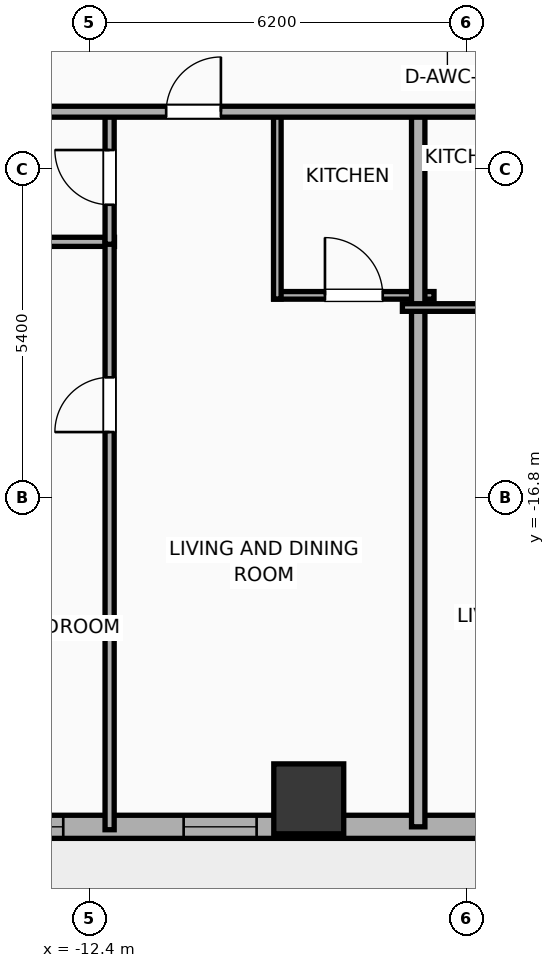
"""IFC4 building model, lengths in metres.
Left out: names, types, materials, properties, quantities, classifications, styles, units other than length and angle.
Written with IfcOpenShell. Run it as: python <this file> out.ifc"""

import sys

from ifc_helpers import new_model, si_unit, direction, frame, frame_2d, origin, origin_2d, place, context, subcontext, project, spatial, rectangle, hollow_rectangle, extrude, element, fill, save


model = new_model("IFC4")
c1 = context("Model", 3, precision=1e-05, world=origin(), true_north=direction((0.0, 1.0)))
c2 = subcontext(c1, "Body", "Model", "MODEL_VIEW")
j1 = project(units=[si_unit("LENGTHUNIT", "METRE"), si_unit("PLANEANGLEUNIT", "RADIAN")], contexts=[c1])
p1 = place(None, origin())
s1 = spatial("IfcSite", under=j1, at=p1, CompositionType="ELEMENT")
p2 = place(p1, origin())
s2 = spatial("IfcBuilding", under=s1, at=p2, CompositionType="ELEMENT")
p3 = place(p2, frame((0.0, 0.0, 26.0)))
s3 = spatial("IfcBuildingStorey", under=s2, at=p3, CompositionType="ELEMENT", Elevation=26.0)
p4 = place(p3, frame((-8.8, -21.75, -0.25), z_axis=(0.0, 0.0, 1.0), x_axis=(1.0, 0.0, 0.0)))
e1 = element("IfcColumn", 1, at=p4, inside=s3, PredefinedType="COLUMN", context=c2, shape_type="SweptSolid", body=[
    extrude(hollow_rectangle(XDim=1.15, YDim=1.15, WallThickness=0.04, at=origin_2d()), origin(), (0.0, 0.0, 1.0), 4.15),
])
p5 = place(p3, frame((22.381, -22.21, 0.0), z_axis=(0.0, 0.0, 1.0), x_axis=(-1.0, 0.0, 0.0)))
e2 = element("IfcWall", 2, at=p5, inside=s3, PredefinedType="ELEMENTEDWALL", context=c2, shape_type="SweptSolid", body=[
    extrude(rectangle(XDim=51.963, YDim=0.38, at=frame_2d((25.981, 0.0))), origin(), (0.0, 0.0, 1.0), 2.54),
])
p6 = place(p5, frame((25.231, 0.0, 0.0)))
e3 = element("IfcOpeningElement", 3, at=p6, cuts=e2, PredefinedType="OPENING", context=c2, shape_type="SweptSolid", body=[
    extrude(rectangle(XDim=1.5, YDim=2.05, at=frame_2d((0.75, 1.025))), frame((0.0, 0.2, 0.0), z_axis=(0.0, -1.0, 0.0), x_axis=(1.0, 0.0, 0.0)), (0.0, 0.0, 1.0), 0.4),
])
p7 = place(p5, frame((6.61, 0.0, 0.75)))
e4 = element("IfcOpeningElement", 4, at=p7, cuts=e2, PredefinedType="OPENING", context=c2, shape_type="SweptSolid", body=[
    extrude(rectangle(XDim=2.4, YDim=1.63, at=frame_2d((1.2, 0.815))), frame((0.0, 0.2, 0.0), z_axis=(0.0, -1.0, 0.0), x_axis=(1.0, 0.0, 0.0)), (0.0, 0.0, 1.0), 0.4),
])
p8 = place(p5, frame((49.132, 0.0, 0.75)))
e5 = element("IfcOpeningElement", 5, at=p8, cuts=e2, PredefinedType="OPENING", context=c2, shape_type="SweptSolid", body=[
    extrude(rectangle(XDim=1.2, YDim=1.63, at=frame_2d((0.6, 0.815))), frame((0.0, 0.2, 0.0), z_axis=(0.0, -1.0, 0.0), x_axis=(1.0, 0.0, 0.0)), (0.0, 0.0, 1.0), 0.4),
])
p9 = place(p5, frame((46.086, 0.0, 0.75)))
e6 = element("IfcOpeningElement", 6, at=p9, cuts=e2, PredefinedType="OPENING", context=c2, shape_type="SweptSolid", body=[
    extrude(rectangle(XDim=1.2, YDim=1.63, at=frame_2d((0.6, 0.815))), frame((0.0, 0.2, 0.0), z_axis=(0.0, -1.0, 0.0), x_axis=(1.0, 0.0, 0.0)), (0.0, 0.0, 1.0), 0.4),
])
p10 = place(p5, frame((42.426, 0.0, 0.75)))
e7 = element("IfcOpeningElement", 7, at=p10, cuts=e2, PredefinedType="OPENING", context=c2, shape_type="SweptSolid", body=[
    extrude(rectangle(XDim=1.2, YDim=1.63, at=frame_2d((0.6, 0.815))), frame((0.0, 0.2, 0.0), z_axis=(0.0, -1.0, 0.0), x_axis=(1.0, 0.0, 0.0)), (0.0, 0.0, 1.0), 0.4),
])
p11 = place(p5, frame((38.286, 0.0, 0.75)))
e8 = element("IfcOpeningElement", 8, at=p11, cuts=e2, PredefinedType="OPENING", context=c2, shape_type="SweptSolid", body=[
    extrude(rectangle(XDim=1.2, YDim=1.63, at=frame_2d((0.6, 0.815))), frame((0.0, 0.2, 0.0), z_axis=(0.0, -1.0, 0.0), x_axis=(1.0, 0.0, 0.0)), (0.0, 0.0, 1.0), 0.4),
])
p12 = place(p5, frame((35.219, 0.0, 0.75)))
e9 = element("IfcOpeningElement", 9, at=p12, cuts=e2, PredefinedType="OPENING", context=c2, shape_type="SweptSolid", body=[
    extrude(rectangle(XDim=1.2, YDim=1.63, at=frame_2d((0.6, 0.815))), frame((0.0, 0.2, 0.0), z_axis=(0.0, -1.0, 0.0), x_axis=(1.0, 0.0, 0.0)), (0.0, 0.0, 1.0), 0.4),
])
p13 = place(p5, frame((32.039, 0.0, 0.75)))
e10 = element("IfcOpeningElement", 10, at=p13, cuts=e2, PredefinedType="OPENING", context=c2, shape_type="SweptSolid", body=[
    extrude(rectangle(XDim=1.2, YDim=1.63, at=frame_2d((0.6, 0.815))), frame((0.0, 0.2, 0.0), z_axis=(0.0, -1.0, 0.0), x_axis=(1.0, 0.0, 0.0)), (0.0, 0.0, 1.0), 0.4),
])
p14 = place(p5, frame((22.686, 0.0, 0.75)))
e11 = element("IfcOpeningElement", 11, at=p14, cuts=e2, PredefinedType="OPENING", context=c2, shape_type="SweptSolid", body=[
    extrude(rectangle(XDim=1.2, YDim=1.63, at=frame_2d((0.6, 0.815))), frame((0.0, 0.2, 0.0), z_axis=(0.0, -1.0, 0.0), x_axis=(1.0, 0.0, 0.0)), (0.0, 0.0, 1.0), 0.4),
])
p15 = place(p5, frame((18.786, 0.0, 0.75)))
e12 = element("IfcOpeningElement", 12, at=p15, cuts=e2, PredefinedType="OPENING", context=c2, shape_type="SweptSolid", body=[
    extrude(rectangle(XDim=1.2, YDim=1.63, at=frame_2d((0.6, 0.815))), frame((0.0, 0.2, 0.0), z_axis=(0.0, -1.0, 0.0), x_axis=(1.0, 0.0, 0.0)), (0.0, 0.0, 1.0), 0.4),
])
p16 = place(p5, frame((14.886, 0.0, 0.75)))
e13 = element("IfcOpeningElement", 13, at=p16, cuts=e2, PredefinedType="OPENING", context=c2, shape_type="SweptSolid", body=[
    extrude(rectangle(XDim=1.2, YDim=1.63, at=frame_2d((0.6, 0.815))), frame((0.0, 0.2, 0.0), z_axis=(0.0, -1.0, 0.0), x_axis=(1.0, 0.0, 0.0)), (0.0, 0.0, 1.0), 0.4),
])
p17 = place(p5, frame((11.826, 0.0, 0.75)))
e14 = element("IfcOpeningElement", 14, at=p17, cuts=e2, PredefinedType="OPENING", context=c2, shape_type="SweptSolid", body=[
    extrude(rectangle(XDim=1.2, YDim=1.63, at=frame_2d((0.6, 0.815))), frame((0.0, 0.2, 0.0), z_axis=(0.0, -1.0, 0.0), x_axis=(1.0, 0.0, 0.0)), (0.0, 0.0, 1.0), 0.4),
])
p18 = place(p5, frame((2.836, 0.0, 0.75)))
e15 = element("IfcOpeningElement", 15, at=p18, cuts=e2, PredefinedType="OPENING", context=c2, shape_type="SweptSolid", body=[
    extrude(rectangle(XDim=1.2, YDim=1.63, at=frame_2d((0.6, 0.815))), frame((0.0, 0.2, 0.0), z_axis=(0.0, -1.0, 0.0), x_axis=(1.0, 0.0, 0.0)), (0.0, 0.0, 1.0), 0.4),
])
p19 = place(p3, frame((-15.06, -12.59, 0.0), z_axis=(0.0, 0.0, 1.0), x_axis=(1.0, 0.0, 0.0)))
e16 = element("IfcWall", 16, at=p19, inside=s3, PredefinedType="PLUMBINGWALL", context=c2, shape_type="SweptSolid", body=[
    extrude(rectangle(XDim=3.065, YDim=0.15, at=frame_2d((1.532, 0.0))), origin(), (0.0, 0.0, 1.0), 3.65),
])
p20 = place(p3, frame((-12.075, -22.258, 0.0), z_axis=(0.0, 0.0, 1.0), x_axis=(0.0, 1.0, 0.0)))
e17 = element("IfcWall", 17, at=p20, inside=s3, PredefinedType="PLUMBINGWALL", context=c2, shape_type="SweptSolid", body=[
    extrude(rectangle(XDim=9.708, YDim=0.15, at=frame_2d((4.854, 0.0))), origin(), (0.0, 0.0, 1.0), 3.65),
])
p21 = place(p20, frame((6.54, 0.0, 0.0)))
e18 = element("IfcOpeningElement", 18, at=p21, cuts=e17, PredefinedType="OPENING", context=c2, shape_type="SweptSolid", body=[
    extrude(rectangle(XDim=0.9, YDim=2.05, at=frame_2d((0.45, 1.025))), frame((0.0, 0.085, 0.0), z_axis=(0.0, -1.0, 0.0), x_axis=(1.0, 0.0, 0.0)), (0.0, 0.0, 1.0), 0.17),
])
p22 = place(p3, frame((-12.075, -12.63, 0.0), z_axis=(0.0, 0.0, 1.0), x_axis=(0.0, 1.0, 0.0)))
e19 = element("IfcWall", 19, at=p22, inside=s3, PredefinedType="PLUMBINGWALL", context=c2, shape_type="SweptSolid", body=[
    extrude(rectangle(XDim=2.2, YDim=0.15, at=frame_2d((1.1, 0.0))), origin(), (0.0, 0.0, 1.0), 2.54),
])
p23 = place(p22, frame((0.65, 0.0, 0.0)))
e20 = element("IfcOpeningElement", 20, at=p23, cuts=e19, PredefinedType="OPENING", context=c2, shape_type="SweptSolid", body=[
    extrude(rectangle(XDim=0.9, YDim=2.05, at=frame_2d((0.45, 1.025))), frame((0.0, 0.085, 0.0), z_axis=(0.0, -1.0, 0.0), x_axis=(1.0, 0.0, 0.0)), (0.0, 0.0, 1.0), 0.17),
])
p24 = place(p3, frame((-9.377, -13.47, 0.0), z_axis=(0.0, 0.0, 1.0), x_axis=(1.0, 0.0, 0.0)))
e21 = element("IfcWall", 21, at=p24, inside=s3, PredefinedType="PARTITIONING", context=c2, shape_type="SweptSolid", body=[
    extrude(rectangle(XDim=2.637, YDim=0.125, at=frame_2d((1.318, 0.0))), origin(), (0.0, 0.0, 1.0), 3.65),
])
p25 = place(p24, frame((0.844, 0.0, 0.0)))
e22 = element("IfcOpeningElement", 22, at=p25, cuts=e21, PredefinedType="OPENING", context=c2, shape_type="SweptSolid", body=[
    extrude(rectangle(XDim=0.95, YDim=2.05, at=frame_2d((0.475, 1.025))), frame((0.0, 0.073, 0.0), z_axis=(0.0, -1.0, 0.0), x_axis=(1.0, 0.0, 0.0)), (0.0, 0.0, 1.0), 0.145),
])
p26 = place(p3, frame((-9.317, -13.53, 0.0), z_axis=(0.0, 0.0, 1.0), x_axis=(0.0, 1.0, 0.0)))
e23 = element("IfcWall", 23, at=p26, inside=s3, PredefinedType="PARTITIONING", context=c2, shape_type="SweptSolid", body=[
    extrude(rectangle(XDim=3.1, YDim=0.125, at=frame_2d((1.55, 0.0))), origin(), (0.0, 0.0, 1.0), 3.65),
])
p27 = place(p3, frame((-7.0, -22.21, 0.0), z_axis=(0.0, 0.0, 1.0), x_axis=(0.0, 1.0, 0.0)))
e24 = element("IfcWall", 24, at=p27, inside=s3, PredefinedType="PARTITIONING", context=c2, shape_type="SweptSolid", body=[
    extrude(rectangle(XDim=11.84, YDim=0.22, at=frame_2d((5.92, 0.0))), origin(), (0.0, 0.0, 1.0), 3.65),
])
p28 = place(p3, frame((-7.26, -13.67, 0.0), z_axis=(0.0, 0.0, 1.0), x_axis=(1.0, 0.0, 0.0)))
e25 = element("IfcWall", 25, at=p28, inside=s3, PredefinedType="PARTITIONING", context=c2, shape_type="SweptSolid", body=[
    extrude(rectangle(XDim=2.69, YDim=0.125, at=frame_2d((1.345, 0.0))), origin(), (0.0, 0.0, 1.0), 3.65),
])
p29 = place(p3, frame((-33.41, -10.45, 0.0), z_axis=(0.0, 0.0, 1.0), x_axis=(1.0, 0.0, 0.0)))
e26 = element("IfcWall", 26, at=p29, inside=s3, PredefinedType="PARTITIONING", context=c2, shape_type="SweptSolid", body=[
    extrude(rectangle(XDim=59.62, YDim=0.18, at=frame_2d((29.81, 0.0))), origin(), (0.0, 0.0, 1.0), 3.65),
])
p30 = place(p29, frame((5.321, 0.0, 0.0)))
e27 = element("IfcOpeningElement", 27, at=p30, cuts=e26, PredefinedType="OPENING", context=c2, shape_type="SweptSolid", body=[
    extrude(rectangle(XDim=1.15, YDim=2.05, at=frame_2d((0.575, 1.025))), frame((0.0, 0.1, 0.0), z_axis=(0.0, -1.0, 0.0), x_axis=(1.0, 0.0, 0.0)), (0.0, 0.0, 1.0), 0.2),
])
p31 = place(p29, frame((14.3, 0.0, 0.0)))
e28 = element("IfcOpeningElement", 28, at=p31, cuts=e26, PredefinedType="OPENING", context=c2, shape_type="SweptSolid", body=[
    extrude(rectangle(XDim=1.15, YDim=2.05, at=frame_2d((0.575, 1.025))), frame((0.0, 0.1, 0.0), z_axis=(0.0, -1.0, 0.0), x_axis=(1.0, 0.0, 0.0)), (0.0, 0.0, 1.0), 0.2),
])
p32 = place(p29, frame((22.265, 0.0, 0.0)))
e29 = element("IfcOpeningElement", 29, at=p32, cuts=e26, PredefinedType="OPENING", context=c2, shape_type="SweptSolid", body=[
    extrude(rectangle(XDim=0.9, YDim=2.05, at=frame_2d((0.45, 1.025))), frame((0.0, 0.1, 0.0), z_axis=(0.0, -1.0, 0.0), x_axis=(1.0, 0.0, 0.0)), (0.0, 0.0, 1.0), 0.2),
])
p33 = place(p29, frame((29.903, 0.0, 0.0)))
e30 = element("IfcOpeningElement", 30, at=p33, cuts=e26, PredefinedType="OPENING", context=c2, shape_type="SweptSolid", body=[
    extrude(rectangle(XDim=1.15, YDim=2.05, at=frame_2d((0.575, 1.025))), frame((0.0, 0.1, 0.0), z_axis=(0.0, -1.0, 0.0), x_axis=(1.0, 0.0, 0.0)), (0.0, 0.0, 1.0), 0.2),
])
p34 = place(p29, frame((37.701, 0.0, 0.0)))
e31 = element("IfcOpeningElement", 31, at=p34, cuts=e26, PredefinedType="OPENING", context=c2, shape_type="SweptSolid", body=[
    extrude(rectangle(XDim=1.15, YDim=2.05, at=frame_2d((0.575, 1.025))), frame((0.0, 0.1, 0.0), z_axis=(0.0, -1.0, 0.0), x_axis=(1.0, 0.0, 0.0)), (0.0, 0.0, 1.0), 0.2),
])
p35 = place(p29, frame((45.654, 0.0, 0.0)))
e32 = element("IfcOpeningElement", 32, at=p35, cuts=e26, PredefinedType="OPENING", context=c2, shape_type="SweptSolid", body=[
    extrude(rectangle(XDim=0.9, YDim=2.05, at=frame_2d((0.45, 1.025))), frame((0.0, 0.1, 0.0), z_axis=(0.0, -1.0, 0.0), x_axis=(1.0, 0.0, 0.0)), (0.0, 0.0, 1.0), 0.2),
])
p36 = place(p29, frame((54.472, 0.0, 0.0)))
e33 = element("IfcOpeningElement", 33, at=p36, cuts=e26, PredefinedType="OPENING", context=c2, shape_type="SweptSolid", body=[
    extrude(rectangle(XDim=1.15, YDim=2.05, at=frame_2d((0.575, 1.025))), frame((0.0, 0.1, 0.0), z_axis=(0.0, -1.0, 0.0), x_axis=(1.0, 0.0, 0.0)), (0.0, 0.0, 1.0), 0.2),
])
p37 = place(p12, origin())
e34 = element("IfcWindow", 34, at=p37, inside=s3, PartitioningType="SINGLE_PANEL", PredefinedType="WINDOW", context=c2, shape_type="SweptSolid", body=[
    extrude(rectangle(XDim=1.2, YDim=1.63, at=frame_2d((0.6, 0.815))), frame((0.0, 0.03, 0.0), z_axis=(0.0, -1.0, 0.0), x_axis=(1.0, 0.0, 0.0)), (0.0, 0.0, 1.0), 0.06),
])
fill(e9, e34)
p38 = place(p13, origin())
e35 = element("IfcWindow", 35, at=p38, inside=s3, PartitioningType="SINGLE_PANEL", PredefinedType="WINDOW", context=c2, shape_type="SweptSolid", body=[
    extrude(rectangle(XDim=1.2, YDim=1.63, at=frame_2d((0.6, 0.815))), frame((0.0, 0.03, 0.0), z_axis=(0.0, -1.0, 0.0), x_axis=(1.0, 0.0, 0.0)), (0.0, 0.0, 1.0), 0.06),
])
fill(e10, e35)
p39 = place(p21, origin())
e36 = element("IfcDoor", 36, at=p39, inside=s3, OperationType="SINGLE_SWING_LEFT", PredefinedType="DOOR", context=c2, shape_type="SweptSolid", body=[
    extrude(rectangle(XDim=0.9, YDim=2.05, at=frame_2d((0.45, 1.025))), frame((0.0, 0.025, 0.0), z_axis=(0.0, -1.0, 0.0), x_axis=(1.0, 0.0, 0.0)), (0.0, 0.0, 1.0), 0.05),
])
fill(e18, e36)
p40 = place(p23, origin())
e37 = element("IfcDoor", 37, at=p40, inside=s3, OperationType="SINGLE_SWING_RIGHT", PredefinedType="DOOR", context=c2, shape_type="SweptSolid", body=[
    extrude(rectangle(XDim=0.9, YDim=2.05, at=frame_2d((0.45, 1.025))), frame((0.0, 0.025, 0.0), z_axis=(0.0, -1.0, 0.0), x_axis=(1.0, 0.0, 0.0)), (0.0, 0.0, 1.0), 0.05),
])
fill(e20, e37)
p41 = place(p25, origin())
e38 = element("IfcDoor", 38, at=p41, inside=s3, OperationType="SINGLE_SWING_LEFT", PredefinedType="DOOR", context=c2, shape_type="SweptSolid", body=[
    extrude(rectangle(XDim=0.95, YDim=2.05, at=frame_2d((0.475, 1.025))), frame((0.0, 0.025, 0.0), z_axis=(0.0, -1.0, 0.0), x_axis=(1.0, 0.0, 0.0)), (0.0, 0.0, 1.0), 0.05),
])
fill(e22, e38)
p42 = place(p32, origin())
e39 = element("IfcDoor", 39, at=p42, inside=s3, OperationType="SINGLE_SWING_RIGHT", PredefinedType="DOOR", context=c2, shape_type="SweptSolid", body=[
    extrude(rectangle(XDim=0.9, YDim=2.05, at=frame_2d((0.45, 1.025))), frame((0.0, 0.025, 0.0), z_axis=(0.0, -1.0, 0.0), x_axis=(1.0, 0.0, 0.0)), (0.0, 0.0, 1.0), 0.05),
])
fill(e29, e39)
save(model, sys.argv[1])
